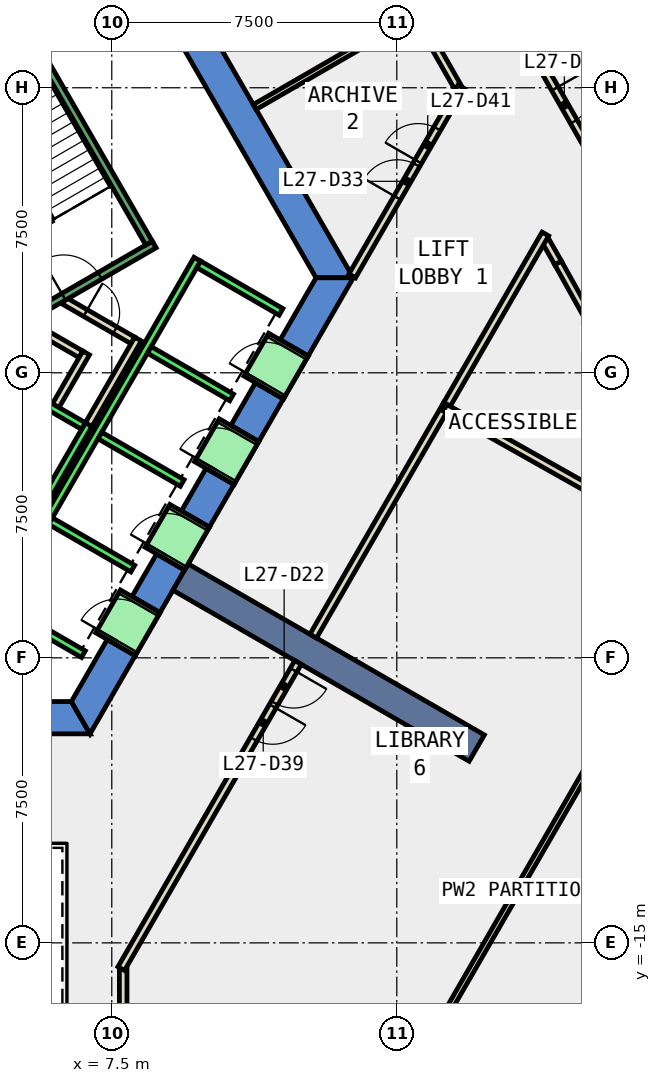
"""IFC4 building model, lengths in metres.
Left out: names, types, materials, properties, quantities, classifications, styles, units other than length and angle.
Written with IfcOpenShell. Run it as: python <this file> out.ifc"""

import sys

from ifc_helpers import new_model, si_unit, direction, frame, frame_2d, origin, place, context, subcontext, project, spatial, polyline, rectangle, outline, extrude, element, fill, save


model = new_model("IFC4")
c1 = context("Model", 3, precision=1e-05, world=origin(), true_north=direction((0.0, 1.0)))
c2 = subcontext(c1, "Body", "Model", "MODEL_VIEW")
j1 = project(units=[si_unit("LENGTHUNIT", "METRE"), si_unit("PLANEANGLEUNIT", "RADIAN")], contexts=[c1])
p1 = place(None, origin())
s1 = spatial("IfcSite", under=j1, at=p1, CompositionType="ELEMENT")
p2 = place(p1, origin())
s2 = spatial("IfcBuilding", under=s1, at=p2, CompositionType="ELEMENT")
p3 = place(p2, frame((0.0, 0.0, 124.4)))
s3 = spatial("IfcBuildingStorey", under=s2, at=p3, CompositionType="ELEMENT", Elevation=124.4)
p4 = place(p3, frame((0.0, 0.0, -0.4)))
e1 = element("IfcWall", 1, at=p4, inside=s3, PredefinedType="SHEAR", context=c2, shape_type="SweptSolid", body=[
    extrude(outline(polyline([(8.517, 11.748), (7.781, 11.323), (12.875, 2.5), (13.856, 2.5), (8.517, 11.748)])), origin(), (0.0, 0.0, 1.0), 4.2),
])
p5 = place(p3, frame((0.0, 0.0, -0.4)))
e2 = element("IfcWall", 2, at=p5, inside=s3, PredefinedType="SHEAR", context=c2, shape_type="SweptSolid", body=[
    extrude(outline(polyline([(5.75, -8.65), (5.75, -9.5), (6.928, -9.5), (6.437, -8.65), (5.75, -8.65)])), origin(), (0.0, 0.0, 1.0), 4.2),
])
p6 = place(p3, frame((0.0, 0.0, -0.4)))
e3 = element("IfcWall", 3, at=p6, inside=s3, PredefinedType="SHEAR", context=c2, shape_type="SweptSolid", body=[
    extrude(outline(polyline([(8.117, -7.44), (7.381, -7.015), (6.437, -8.65), (6.928, -9.5), (8.117, -7.44)])), origin(), (0.0, 0.0, 1.0), 4.2),
])
p7 = place(p3, frame((0.0, 0.0, -0.4)))
e4 = element("IfcWall", 4, at=p7, inside=s3, PredefinedType="SHEAR", context=c2, shape_type="SweptSolid", body=[
    extrude(outline(polyline([(9.417, -5.189), (8.681, -4.764), (8.031, -5.889), (8.767, -6.314), (9.417, -5.189)])), origin(), (0.0, 0.0, 1.0), 4.2),
])
p8 = place(p3, frame((0.0, 0.0, -0.4)))
e5 = element("IfcWall", 5, at=p8, inside=s3, PredefinedType="SHEAR", context=c2, shape_type="SweptSolid", body=[
    extrude(outline(polyline([(10.717, -2.937), (9.981, -2.512), (9.331, -3.638), (10.067, -4.063), (10.717, -2.937)])), origin(), (0.0, 0.0, 1.0), 4.2),
])
p9 = place(p3, frame((0.0, 0.0, -0.4)))
e6 = element("IfcWall", 6, at=p9, inside=s3, PredefinedType="SHEAR", context=c2, shape_type="SweptSolid", body=[
    extrude(outline(polyline([(12.017, -0.686), (11.281, -0.261), (10.631, -1.386), (11.367, -1.811), (12.017, -0.686)])), origin(), (0.0, 0.0, 1.0), 4.2),
])
p10 = place(p3, frame((0.0, 0.0, -0.4)))
e7 = element("IfcWall", 7, at=p10, inside=s3, PredefinedType="SHEAR", context=c2, shape_type="SweptSolid", body=[
    extrude(outline(polyline([(11.931, 0.865), (12.667, 0.44), (13.856, 2.5), (12.875, 2.5), (11.931, 0.865)])), origin(), (0.0, 0.0, 1.0), 4.2),
])
p11 = place(p3, frame((0.0, 0.0, 3.6)))
e8 = element("IfcWall", 8, at=p11, inside=s3, PredefinedType="SHEAR", context=c2, shape_type="SweptSolid", body=[
    extrude(outline(polyline([(8.767, -6.314), (8.031, -5.889), (7.381, -7.015), (8.117, -7.44), (8.767, -6.314)])), origin(), (0.0, 0.0, 1.0), 0.2),
])
p12 = place(p3, frame((0.0, 0.0, 3.6)))
e9 = element("IfcWall", 9, at=p12, inside=s3, PredefinedType="SHEAR", context=c2, shape_type="SweptSolid", body=[
    extrude(outline(polyline([(10.067, -4.063), (9.331, -3.638), (8.681, -4.764), (9.417, -5.189), (10.067, -4.063)])), origin(), (0.0, 0.0, 1.0), 0.2),
])
p13 = place(p3, frame((0.0, 0.0, 3.6)))
e10 = element("IfcWall", 10, at=p13, inside=s3, PredefinedType="SHEAR", context=c2, shape_type="SweptSolid", body=[
    extrude(outline(polyline([(11.367, -1.811), (10.631, -1.386), (9.981, -2.512), (10.717, -2.937), (11.367, -1.811)])), origin(), (0.0, 0.0, 1.0), 0.2),
])
p14 = place(p3, frame((0.0, 0.0, 3.6)))
e11 = element("IfcWall", 11, at=p14, inside=s3, PredefinedType="SHEAR", context=c2, shape_type="SweptSolid", body=[
    extrude(outline(polyline([(12.667, 0.44), (11.931, 0.865), (11.281, -0.261), (12.017, -0.686), (12.667, 0.44)])), origin(), (0.0, 0.0, 1.0), 0.2),
])
p15 = place(p3, frame((9.31, -5.375, -0.4), z_axis=(0.0, 0.0, 1.0), x_axis=(0.866017533419, -0.500013631625, 0.0)))
e12 = element("IfcWall", 12, at=p15, inside=s3, PredefinedType="SHEAR", context=c2, shape_type="SweptSolid", body=[
    extrude(rectangle(XDim=9.0, YDim=0.8, at=frame_2d((4.5, 0.0))), origin(), (0.0, 0.0, 1.0), 4.2),
])
p16 = place(p3, frame((16.601, 7.526, 0.0), z_axis=(0.0, 0.0, 1.0), x_axis=(-0.495652400286, 0.868520983103, 0.0)))
e13 = element("IfcWall", 13, at=p16, inside=s3, PredefinedType="PARTITIONING", context=c2, shape_type="SweptSolid", body=[
    extrude(rectangle(XDim=1.784, YDim=0.2, at=frame_2d((0.892, 0.0))), origin(), (0.0, 0.0, 1.0), 3.8),
])
p17 = place(p3, frame((22.702, -3.321, 0.0), z_axis=(0.0, 0.0, 1.0), x_axis=(-0.486304341235, 0.873789498504, 0.0)))
e14 = element("IfcWall", 14, at=p17, inside=s3, PredefinedType="PARTITIONING", context=c2, shape_type="SweptSolid", body=[
    extrude(rectangle(XDim=7.113, YDim=0.2, at=frame_2d((3.556, 0.0))), origin(), (0.0, 0.0, 1.0), 3.8),
])
p18 = place(p17, frame((3.057, 0.0, 0.0)))
e15 = element("IfcOpeningElement", 15, at=p18, cuts=e14, PredefinedType="OPENING", context=c2, shape_type="SweptSolid", body=[
    extrude(rectangle(XDim=1.0, YDim=2.1, at=frame_2d((0.5, 1.05))), frame((0.0, 0.11, 0.0), z_axis=(0.0, -1.0, 0.0), x_axis=(1.0, 0.0, 0.0)), (0.0, 0.0, 1.0), 0.22),
])
p19 = place(p3, frame((19.243, 2.894, 0.0), z_axis=(0.0, 0.0, 1.0), x_axis=(-0.494108984218, 0.869399972231, 0.0)))
e16 = element("IfcWall", 16, at=p19, inside=s3, PredefinedType="PARTITIONING", context=c2, shape_type="SweptSolid", body=[
    extrude(rectangle(XDim=0.674, YDim=0.2, at=frame_2d((0.337, 0.0))), origin(), (0.0, 0.0, 1.0), 3.8),
])
p20 = place(p3, frame((17.623, 10.175, 0.0), z_axis=(0.0, 0.0, 1.0), x_axis=(0.4954688358, -0.868625714995, 0.0)))
e17 = element("IfcWall", 17, at=p20, inside=s3, PredefinedType="PARTITIONING", context=c2, shape_type="SweptSolid", body=[
    extrude(rectangle(XDim=7.064, YDim=0.2, at=frame_2d((3.532, 0.0))), origin(), (0.0, 0.0, 1.0), 3.8),
])
p21 = place(p20, frame((3.107, 0.0, 0.0)))
e18 = element("IfcOpeningElement", 18, at=p21, cuts=e17, PredefinedType="OPENING", context=c2, shape_type="SweptSolid", body=[
    extrude(rectangle(XDim=1.0, YDim=2.1, at=frame_2d((0.5, 1.05))), frame((0.0, 0.11, 0.0), z_axis=(0.0, -1.0, 0.0), x_axis=(1.0, 0.0, 0.0)), (0.0, 0.0, 1.0), 0.22),
])
p22 = place(p3, frame((5.499, 1.172, 0.0), z_axis=(0.0, 0.0, 1.0), x_axis=(0.866333505267, -0.499465972466, 0.0)))
e19 = element("IfcWall", 19, at=p22, inside=s3, PredefinedType="PARTITIONING", context=c2, shape_type="SweptSolid", body=[
    extrude(rectangle(XDim=1.374, YDim=0.2, at=frame_2d((0.687, 0.0))), origin(), (0.0, 0.0, 1.0), 3.8),
])
p23 = place(p3, frame((6.826, 0.522, 0.0), z_axis=(0.0, 0.0, 1.0), x_axis=(-0.500016722714, -0.866015748706, 0.0)))
e20 = element("IfcWall", 20, at=p23, inside=s3, PredefinedType="PARTITIONING", context=c2, shape_type="SweptSolid", body=[
    extrude(rectangle(XDim=1.7, YDim=0.2, at=frame_2d((0.85, 0.0))), origin(), (0.0, 0.0, 1.0), 3.8),
])
p24 = place(p3, frame((6.25, 1.894, 0.0), z_axis=(0.0, 0.0, 1.0), x_axis=(0.866043184279, -0.499969202016, 0.0)))
e21 = element("IfcWall", 21, at=p24, inside=s3, PredefinedType="PARTITIONING", context=c2, shape_type="SweptSolid", body=[
    extrude(rectangle(XDim=2.084, YDim=0.2, at=frame_2d((1.042, 0.0))), origin(), (0.0, 0.0, 1.0), 3.8),
])
p25 = place(p24, frame((0.642, 0.0, 0.0)))
e22 = element("IfcOpeningElement", 22, at=p25, cuts=e21, PredefinedType="OPENING", context=c2, shape_type="SweptSolid", body=[
    extrude(rectangle(XDim=0.9, YDim=2.1, at=frame_2d((0.45, 1.05))), frame((0.0, 0.11, 0.0), z_axis=(0.0, -1.0, 0.0), x_axis=(1.0, 0.0, 0.0)), (0.0, 0.0, 1.0), 0.22),
])
p26 = place(p3, frame((8.192, 0.888, 0.0), z_axis=(0.0, 0.0, 1.0), x_axis=(-0.499940625693, -0.866059680843, 0.0)))
e23 = element("IfcWall", 23, at=p26, inside=s3, PredefinedType="PARTITIONING", context=c2, shape_type="SweptSolid", body=[
    extrude(rectangle(XDim=2.68, YDim=0.2, at=frame_2d((1.34, 0.0))), origin(), (0.0, 0.0, 1.0), 3.8),
])
p27 = place(p3, frame((11.261, 6.994, 0.0), z_axis=(0.0, 0.0, 1.0), x_axis=(0.866013769041, 0.500020151426, 0.0)))
e24 = element("IfcWall", 24, at=p27, inside=s3, PredefinedType="PARTITIONING", context=c2, shape_type="SweptSolid", body=[
    extrude(rectangle(XDim=4.898, YDim=0.15, at=frame_2d((2.449, 0.0))), origin(), (0.0, 0.0, 1.0), 3.8),
])
p28 = place(p3, frame((13.827, 2.55, 0.0), z_axis=(0.0, 0.0, 1.0), x_axis=(0.500032637853, 0.866006559491, 0.0)))
e25 = element("IfcWall", 25, at=p28, inside=s3, PredefinedType="PARTITIONING", context=c2, shape_type="SweptSolid", body=[
    extrude(rectangle(XDim=5.746, YDim=0.2, at=frame_2d((2.873, 0.0))), origin(), (0.0, 0.0, 1.0), 3.8),
])
p29 = place(p28, frame((2.373, 0.0, 0.0)))
e26 = element("IfcOpeningElement", 26, at=p29, cuts=e25, PredefinedType="OPENING", context=c2, shape_type="SweptSolid", body=[
    extrude(rectangle(XDim=1.0, YDim=2.1, at=frame_2d((0.5, 1.05))), frame((0.0, 0.11, 0.0), z_axis=(0.0, -1.0, 0.0), x_axis=(1.0, 0.0, 0.0)), (0.0, 0.0, 1.0), 0.22),
])
p30 = place(p28, frame((3.473, 0.0, 0.0)))
e27 = element("IfcOpeningElement", 27, at=p30, cuts=e25, PredefinedType="OPENING", context=c2, shape_type="SweptSolid", body=[
    extrude(rectangle(XDim=1.0, YDim=2.1, at=frame_2d((0.5, 1.05))), frame((0.0, 0.11, 0.0), z_axis=(0.0, -1.0, 0.0), x_axis=(1.0, 0.0, 0.0)), (0.0, 0.0, 1.0), 0.22),
])
p31 = place(p3, frame((7.8, -15.69, 0.0), z_axis=(0.0, 0.0, 1.0), x_axis=(0.0, -1.0, 0.0)))
e28 = element("IfcWall", 28, at=p31, inside=s3, PredefinedType="PARTITIONING", context=c2, shape_type="SweptSolid", body=[
    extrude(rectangle(XDim=2.924, YDim=0.2, at=frame_2d((1.462, 0.0))), origin(), (0.0, 0.0, 1.0), 3.8),
])
p32 = place(p3, frame((16.32, -0.832, 0.0), z_axis=(0.0, 0.0, 1.0), x_axis=(-0.499951642806, -0.866053321023, 0.0)))
e29 = element("IfcWall", 29, at=p32, inside=s3, PredefinedType="PARTITIONING", context=c2, shape_type="SweptSolid", body=[
    extrude(rectangle(XDim=7.039, YDim=0.2, at=frame_2d((3.52, 0.0))), origin(), (0.0, 0.0, 1.0), 3.8),
])
p33 = place(p3, frame((18.91, 3.653, 0.0), z_axis=(0.0, 0.0, 1.0), x_axis=(-0.500052967229, -0.865994820981, 0.0)))
e30 = element("IfcWall", 30, at=p33, inside=s3, PredefinedType="PARTITIONING", context=c2, shape_type="SweptSolid", body=[
    extrude(rectangle(XDim=5.179, YDim=0.2, at=frame_2d((2.59, 0.0))), origin(), (0.0, 0.0, 1.0), 3.8),
])
p34 = place(p3, frame((16.27, -0.919, 0.0), z_axis=(0.0, 0.0, 1.0), x_axis=(0.871308980511, -0.490734816863, 0.0)))
e31 = element("IfcWall", 31, at=p34, inside=s3, PredefinedType="PARTITIONING", context=c2, shape_type="SweptSolid", body=[
    extrude(rectangle(XDim=8.1, YDim=0.2, at=frame_2d((4.05, 0.0))), origin(), (0.0, 0.0, 1.0), 3.8),
])
p35 = place(p3, frame((20.924, -8.858, 0.0), z_axis=(0.0, 0.0, 1.0), x_axis=(-0.499996828157, -0.866027235041, 0.0)))
e32 = element("IfcWall", 32, at=p35, inside=s3, PredefinedType="PARTITIONING", context=c2, shape_type="SweptSolid", body=[
    extrude(rectangle(XDim=11.04, YDim=0.15, at=frame_2d((5.52, 0.0))), origin(), (0.0, 0.0, 1.0), 3.8),
])
p36 = place(p3, frame((12.401, -7.621, 0.0), z_axis=(0.0, 0.0, 1.0), x_axis=(-0.499983724212, -0.866034800411, 0.0)))
e33 = element("IfcWall", 33, at=p36, inside=s3, PredefinedType="PARTITIONING", context=c2, shape_type="SweptSolid", body=[
    extrude(rectangle(XDim=9.302, YDim=0.2, at=frame_2d((4.651, 0.0))), origin(), (0.0, 0.0, 1.0), 3.8),
])
p37 = place(p36, frame((0.231, 0.0, 0.0)))
e34 = element("IfcOpeningElement", 34, at=p37, cuts=e33, PredefinedType="OPENING", context=c2, shape_type="SweptSolid", body=[
    extrude(rectangle(XDim=1.0, YDim=2.1, at=frame_2d((0.5, 1.05))), frame((0.0, 0.11, 0.0), z_axis=(0.0, -1.0, 0.0), x_axis=(1.0, 0.0, 0.0)), (0.0, 0.0, 1.0), 0.22),
])
p38 = place(p36, frame((1.331, 0.0, 0.0)))
e35 = element("IfcOpeningElement", 35, at=p38, cuts=e33, PredefinedType="OPENING", context=c2, shape_type="SweptSolid", body=[
    extrude(rectangle(XDim=1.0, YDim=2.1, at=frame_2d((0.5, 1.05))), frame((0.0, 0.11, 0.0), z_axis=(0.0, -1.0, 0.0), x_axis=(1.0, 0.0, 0.0)), (0.0, 0.0, 1.0), 0.22),
])
p39 = place(p3, frame((5.492, -3.788, 0.0), z_axis=(0.0, 0.0, 1.0), x_axis=(0.500011755427, 0.866018616679, 0.0)))
e36 = element("IfcWall", 36, at=p39, inside=s3, PredefinedType="STANDARD", context=c2, shape_type="SweptSolid", body=[
    extrude(rectangle(XDim=2.8, YDim=0.2, at=frame_2d((1.4, 0.0))), origin(), (0.0, 0.0, 1.0), 3.8),
])
p40 = place(p3, frame((4.677, -0.2, 0.0), z_axis=(0.0, 0.0, 1.0), x_axis=(0.865973769406, -0.500089422704, 0.0)))
e37 = element("IfcWall", 37, at=p40, inside=s3, PredefinedType="STANDARD", context=c2, shape_type="SweptSolid", body=[
    extrude(rectangle(XDim=2.399, YDim=0.2, at=frame_2d((1.2, 0.0))), origin(), (0.0, 0.0, 1.0), 3.8),
])
p41 = place(p3, frame((4.451, -6.19, 0.0), z_axis=(0.0, 0.0, 1.0), x_axis=(0.50000090737, 0.866024879913, 0.0)))
e38 = element("IfcWall", 38, at=p41, inside=s3, PredefinedType="STANDARD", context=c2, shape_type="SweptSolid", body=[
    extrude(rectangle(XDim=10.6, YDim=0.2, at=frame_2d((5.3, 0.0))), origin(), (0.0, 0.0, 1.0), 3.8),
])
for number, where, z_axis, x_axis in (
    (39, (4.588, -6.153, 0.0), (0.0, 0.0, 1.0), (0.866, -0.5, 0.0)),
    (40, (5.888, -3.902, 0.0), (0.0, 0.0, 1.0), (0.866, -0.5, 0.0)),
    (41, (7.188, -1.65, 0.0), (0.0, 0.0, 1.0), (0.866, -0.5, 0.0)),
    (42, (8.488, 0.602, 0.0), (0.0, 0.0, 1.0), (0.866, -0.5, 0.0)),
):
    element("IfcWall", number, at=place(p3, frame(where, z_axis=z_axis, x_axis=x_axis)), inside=s3, PredefinedType="STANDARD", context=c2, shape_type="SweptSolid", body=[
        extrude(rectangle(XDim=2.5, YDim=0.2, at=frame_2d((1.25, 0.0))), origin(), (0.0, 0.0, 1.0), 3.8),
    ])
p42 = place(p3, frame((9.788, 2.853, 0.0), z_axis=(0.0, 0.0, 1.0), x_axis=(0.865998541277, -0.500046524342, 0.0)))
e43 = element("IfcWall", 43, at=p42, inside=s3, PredefinedType="STANDARD", context=c2, shape_type="SweptSolid", body=[
    extrude(rectangle(XDim=2.5, YDim=0.2, at=frame_2d((1.25, 0.0))), origin(), (0.0, 0.0, 1.0), 3.8),
])
p43 = place(p3, frame((7.598, -7.14, 0.0), z_axis=(0.0, 0.0, 1.0), x_axis=(0.500362116554, 0.865816234728, 0.0)))
e44 = element("IfcWall", 44, at=p43, inside=s3, PredefinedType="STANDARD", context=c2, shape_type="SweptSolid", body=[
    extrude(rectangle(XDim=1.299, YDim=1.2, at=frame_2d((0.65, 0.0))), origin(), (0.0, 0.0, 1.0), 2.4),
])
p44 = place(p43, frame((0.1, 0.0, 0.0)))
e45 = element("IfcOpeningElement", 45, at=p44, cuts=e44, PredefinedType="OPENING", context=c2, shape_type="SweptSolid", body=[
    extrude(rectangle(XDim=1.1, YDim=2.3, at=frame_2d((0.55, 1.15))), frame((0.0, 0.61, 0.0), z_axis=(0.0, -1.0, 0.0), x_axis=(1.0, 0.0, 0.0)), (0.0, 0.0, 1.0), 1.22),
])
p45 = place(p3, frame((8.898, -4.889, 0.0), z_axis=(0.0, 0.0, 1.0), x_axis=(0.500036693733, 0.866004217611, 0.0)))
e46 = element("IfcWall", 46, at=p45, inside=s3, PredefinedType="STANDARD", context=c2, shape_type="SweptSolid", body=[
    extrude(rectangle(XDim=1.3, YDim=1.2, at=frame_2d((0.65, 0.0))), origin(), (0.0, 0.0, 1.0), 2.4),
])
p46 = place(p45, frame((0.1, 0.0, 0.0)))
e47 = element("IfcOpeningElement", 47, at=p46, cuts=e46, PredefinedType="OPENING", context=c2, shape_type="SweptSolid", body=[
    extrude(rectangle(XDim=1.1, YDim=2.3, at=frame_2d((0.55, 1.15))), frame((0.0, 0.61, 0.0), z_axis=(0.0, -1.0, 0.0), x_axis=(1.0, 0.0, 0.0)), (0.0, 0.0, 1.0), 1.22),
])
p47 = place(p3, frame((10.198, -2.637, 0.0), z_axis=(0.0, 0.0, 1.0), x_axis=(0.49989585183, 0.866085525409, 0.0)))
e48 = element("IfcWall", 48, at=p47, inside=s3, PredefinedType="STANDARD", context=c2, shape_type="SweptSolid", body=[
    extrude(rectangle(XDim=1.3, YDim=1.2, at=frame_2d((0.65, 0.0))), origin(), (0.0, 0.0, 1.0), 2.4),
])
p48 = place(p47, frame((0.1, 0.0, 0.0)))
e49 = element("IfcOpeningElement", 49, at=p48, cuts=e48, PredefinedType="OPENING", context=c2, shape_type="SweptSolid", body=[
    extrude(rectangle(XDim=1.1, YDim=2.3, at=frame_2d((0.55, 1.15))), frame((0.0, 0.61, 0.0), z_axis=(0.0, -1.0, 0.0), x_axis=(1.0, 0.0, 0.0)), (0.0, 0.0, 1.0), 1.22),
])
p49 = place(p3, frame((11.498, -0.385, 0.0), z_axis=(0.0, 0.0, 1.0), x_axis=(0.500221244143, 0.865897630733, 0.0)))
e50 = element("IfcWall", 50, at=p49, inside=s3, PredefinedType="STANDARD", context=c2, shape_type="SweptSolid", body=[
    extrude(rectangle(XDim=1.299, YDim=1.2, at=frame_2d((0.65, 0.0))), origin(), (0.0, 0.0, 1.0), 2.4),
])
p50 = place(p49, frame((0.1, 0.0, 0.0)))
e51 = element("IfcOpeningElement", 51, at=p50, cuts=e50, PredefinedType="OPENING", context=c2, shape_type="SweptSolid", body=[
    extrude(rectangle(XDim=1.1, YDim=2.3, at=frame_2d((0.55, 1.15))), frame((0.0, 0.61, 0.0), z_axis=(0.0, -1.0, 0.0), x_axis=(1.0, 0.0, 0.0)), (0.0, 0.0, 1.0), 1.22),
])
p51 = place(p3, frame((4.806, 1.176, 0.0), z_axis=(0.0, 0.0, 1.0), x_axis=(0.866059941101, 0.499940174841, 0.0)))
e52 = element("IfcWall", 52, at=p51, inside=s3, PredefinedType="STANDARD", context=c2, shape_type="SweptSolid", body=[
    extrude(rectangle(XDim=4.4, YDim=0.2, at=frame_2d((2.2, 0.0))), origin(), (0.0, 0.0, 1.0), 3.8),
])
p52 = place(p51, frame((1.65, 0.0, 0.0)))
e53 = element("IfcOpeningElement", 53, at=p52, cuts=e52, PredefinedType="OPENING", context=c2, shape_type="SweptSolid", body=[
    extrude(rectangle(XDim=1.1, YDim=2.2, at=frame_2d((0.55, 1.1))), frame((0.0, 0.11, 0.0), z_axis=(0.0, -1.0, 0.0), x_axis=(1.0, 0.0, 0.0)), (0.0, 0.0, 1.0), 0.22),
])
p53 = place(p3, frame((8.48, 3.412, 0.0), z_axis=(0.0, 0.0, 1.0), x_axis=(-0.499978703459, 0.866037698999, 0.0)))
e54 = element("IfcWall", 54, at=p53, inside=s3, PredefinedType="STANDARD", context=c2, shape_type="SweptSolid", body=[
    extrude(rectangle(XDim=6.9, YDim=0.2, at=frame_2d((3.45, 0.0))), origin(), (0.0, 0.0, 1.0), 3.8),
])
p54 = place(p21, origin())
e55 = element("IfcDoor", 55, at=p54, inside=s3, OperationType="SINGLE_SWING_LEFT", PredefinedType="DOOR", context=c2, shape_type="SweptSolid", body=[
    extrude(rectangle(XDim=1.0, YDim=2.1, at=frame_2d((0.5, 1.05))), frame((0.0, 0.025, 0.0), z_axis=(0.0, -1.0, 0.0), x_axis=(1.0, 0.0, 0.0)), (0.0, 0.0, 1.0), 0.05),
])
fill(e18, e55)
p55 = place(p37, origin())
e56 = element("IfcDoor", 56, at=p55, inside=s3, OperationType="SINGLE_SWING_LEFT", PredefinedType="DOOR", context=c2, shape_type="SweptSolid", body=[
    extrude(rectangle(XDim=1.0, YDim=2.1, at=frame_2d((0.5, 1.05))), frame((0.0, 0.025, 0.0), z_axis=(0.0, -1.0, 0.0), x_axis=(1.0, 0.0, 0.0)), (0.0, 0.0, 1.0), 0.05),
])
fill(e34, e56)
p56 = place(p29, origin())
e57 = element("IfcDoor", 57, at=p56, inside=s3, OperationType="SINGLE_SWING_LEFT", PredefinedType="DOOR", context=c2, shape_type="SweptSolid", body=[
    extrude(rectangle(XDim=1.0, YDim=2.1, at=frame_2d((0.5, 1.05))), frame((0.0, 0.025, 0.0), z_axis=(0.0, -1.0, 0.0), x_axis=(1.0, 0.0, 0.0)), (0.0, 0.0, 1.0), 0.05),
])
fill(e26, e57)
p57 = place(p25, origin())
e58 = element("IfcDoor", 58, at=p57, inside=s3, OperationType="SINGLE_SWING_LEFT", PredefinedType="DOOR", context=c2, shape_type="SweptSolid", body=[
    extrude(rectangle(XDim=0.9, YDim=2.1, at=frame_2d((0.45, 1.05))), frame((0.0, 0.025, 0.0), z_axis=(0.0, -1.0, 0.0), x_axis=(1.0, 0.0, 0.0)), (0.0, 0.0, 1.0), 0.05),
])
fill(e22, e58)
p58 = place(p38, origin())
e59 = element("IfcDoor", 59, at=p58, inside=s3, OperationType="SINGLE_SWING_RIGHT", PredefinedType="DOOR", context=c2, shape_type="SweptSolid", body=[
    extrude(rectangle(XDim=1.0, YDim=2.1, at=frame_2d((0.5, 1.05))), frame((0.0, 0.025, 0.0), z_axis=(0.0, -1.0, 0.0), x_axis=(1.0, 0.0, 0.0)), (0.0, 0.0, 1.0), 0.05),
])
fill(e35, e59)
p59 = place(p30, origin())
e60 = element("IfcDoor", 60, at=p59, inside=s3, OperationType="SINGLE_SWING_RIGHT", PredefinedType="DOOR", context=c2, shape_type="SweptSolid", body=[
    extrude(rectangle(XDim=1.0, YDim=2.1, at=frame_2d((0.5, 1.05))), frame((0.0, 0.025, 0.0), z_axis=(0.0, -1.0, 0.0), x_axis=(1.0, 0.0, 0.0)), (0.0, 0.0, 1.0), 0.05),
])
fill(e27, e60)
p60 = place(p44, origin())
e61 = element("IfcDoor", 61, at=p60, inside=s3, OperationType="SLIDING_TO_LEFT", PredefinedType="DOOR", context=c2, shape_type="SweptSolid", body=[
    extrude(rectangle(XDim=1.1, YDim=2.3, at=frame_2d((0.55, 1.15))), frame((0.0, 0.025, 0.0), z_axis=(0.0, -1.0, 0.0), x_axis=(1.0, 0.0, 0.0)), (0.0, 0.0, 1.0), 0.05),
])
fill(e45, e61)
p61 = place(p46, origin())
e62 = element("IfcDoor", 62, at=p61, inside=s3, OperationType="SLIDING_TO_LEFT", PredefinedType="DOOR", context=c2, shape_type="SweptSolid", body=[
    extrude(rectangle(XDim=1.1, YDim=2.3, at=frame_2d((0.55, 1.15))), frame((0.0, 0.025, 0.0), z_axis=(0.0, -1.0, 0.0), x_axis=(1.0, 0.0, 0.0)), (0.0, 0.0, 1.0), 0.05),
])
fill(e47, e62)
p62 = place(p48, origin())
e63 = element("IfcDoor", 63, at=p62, inside=s3, OperationType="SLIDING_TO_LEFT", PredefinedType="DOOR", context=c2, shape_type="SweptSolid", body=[
    extrude(rectangle(XDim=1.1, YDim=2.3, at=frame_2d((0.55, 1.15))), frame((0.0, 0.025, 0.0), z_axis=(0.0, -1.0, 0.0), x_axis=(1.0, 0.0, 0.0)), (0.0, 0.0, 1.0), 0.05),
])
fill(e49, e63)
p63 = place(p50, origin())
e64 = element("IfcDoor", 64, at=p63, inside=s3, OperationType="SLIDING_TO_LEFT", PredefinedType="DOOR", context=c2, shape_type="SweptSolid", body=[
    extrude(rectangle(XDim=1.1, YDim=2.3, at=frame_2d((0.55, 1.15))), frame((0.0, 0.025, 0.0), z_axis=(0.0, -1.0, 0.0), x_axis=(1.0, 0.0, 0.0)), (0.0, 0.0, 1.0), 0.05),
])
fill(e51, e64)
p64 = place(p52, origin())
e65 = element("IfcDoor", 65, at=p64, inside=s3, OperationType="SINGLE_SWING_LEFT", PredefinedType="DOOR", context=c2, shape_type="SweptSolid", body=[
    extrude(rectangle(XDim=1.1, YDim=2.2, at=frame_2d((0.55, 1.1))), frame((0.0, 0.025, 0.0), z_axis=(0.0, -1.0, 0.0), x_axis=(1.0, 0.0, 0.0)), (0.0, 0.0, 1.0), 0.05),
])
fill(e53, e65)
save(model, sys.argv[1])
